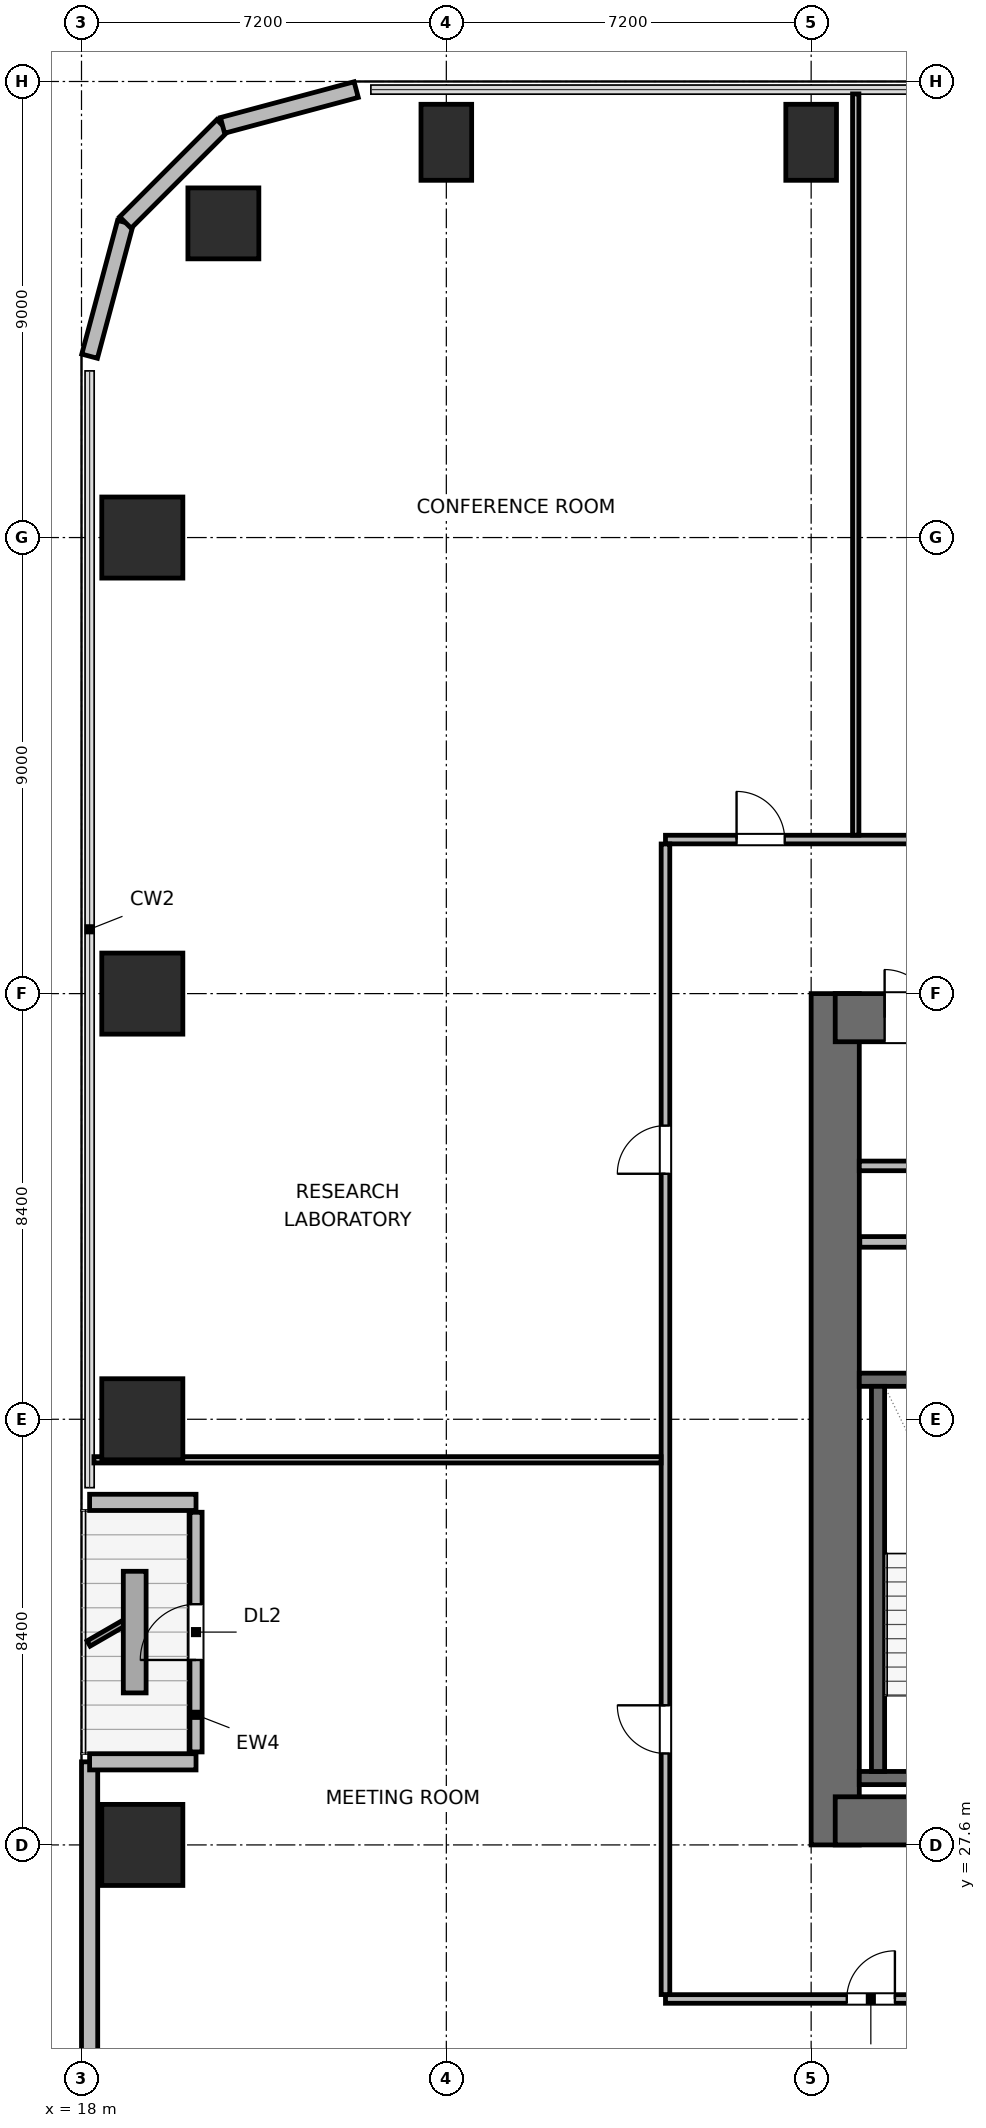
"""IFC4 building model, lengths in metres.
Left out: names, types, materials, properties, quantities, classifications, styles, units other than length and angle.
Written with IfcOpenShell. Run it as: python <this file> out.ifc"""

import sys

from ifc_helpers import new_model, si_unit, direction, frame, frame_2d, origin, origin_2d, place, context, subcontext, project, spatial, rectangle, circle, extrude, element, fill, save


model = new_model("IFC4")
c1 = context("Model", 3, precision=1e-05, world=origin(), true_north=direction((0.0, 1.0)))
c2 = subcontext(c1, "Body", "Model", "MODEL_VIEW")
j1 = project(units=[si_unit("LENGTHUNIT", "METRE"), si_unit("PLANEANGLEUNIT", "RADIAN")], contexts=[c1])
p1 = place(None, origin())
s1 = spatial("IfcSite", under=j1, at=p1, CompositionType="ELEMENT")
p2 = place(p1, origin())
s2 = spatial("IfcBuilding", under=s1, at=p2, CompositionType="ELEMENT")
p3 = place(p2, frame((0.0, 0.0, 76.8)))
s3 = spatial("IfcBuildingStorey", under=s2, at=p3, CompositionType="ELEMENT", Elevation=76.8)
p4 = place(p3, frame((32.875, 27.6, 0.0), z_axis=(0.0, 0.0, 1.0), x_axis=(0.0, 1.0, 0.0)))
e1 = element("IfcWall", 1, at=p4, inside=s3, PredefinedType="SHEAR", context=c2, shape_type="SweptSolid", body=[
    extrude(rectangle(XDim=16.8, YDim=0.95, at=frame_2d((8.4, 0.0))), origin(), (0.0, 0.0, 1.0), 3.9),
])
p5 = place(p3, frame((32.875, 28.075, 0.0), z_axis=(0.0, 0.0, 1.0), x_axis=(1.0, 0.0, 0.0)))
e2 = element("IfcWall", 2, at=p5, inside=s3, PredefinedType="SHEAR", context=c2, shape_type="SweptSolid", body=[
    extrude(rectangle(XDim=9.05, YDim=0.95, at=frame_2d((4.525, 0.0))), origin(), (0.0, 0.0, 1.0), 3.9),
])
p6 = place(p5, frame((4.975, 0.0, 0.0)))
e3 = element("IfcOpeningElement", 3, at=p6, cuts=e2, PredefinedType="OPENING", context=c2, shape_type="SweptSolid", body=[
    extrude(rectangle(XDim=1.05, YDim=2.04, at=frame_2d((0.525, 1.02))), frame((0.0, 0.485, 0.0), z_axis=(0.0, -1.0, 0.0), x_axis=(1.0, 0.0, 0.0)), (0.0, 0.0, 1.0), 0.97),
])
p7 = place(p3, frame((32.875, 43.925, 0.0), z_axis=(0.0, 0.0, 1.0), x_axis=(1.0, 0.0, 0.0)))
e4 = element("IfcWall", 4, at=p7, inside=s3, PredefinedType="SHEAR", context=c2, shape_type="SweptSolid", body=[
    extrude(rectangle(XDim=9.05, YDim=0.95, at=frame_2d((4.525, 0.0))), origin(), (0.0, 0.0, 1.0), 3.9),
])
p8 = place(p7, frame((0.975, 0.0, 0.0)))
e5 = element("IfcOpeningElement", 5, at=p8, cuts=e4, PredefinedType="OPENING", context=c2, shape_type="SweptSolid", body=[
    extrude(rectangle(XDim=0.95, YDim=2.04, at=frame_2d((0.475, 1.02))), frame((0.0, 0.485, 0.0), z_axis=(0.0, -1.0, 0.0), x_axis=(1.0, 0.0, 0.0)), (0.0, 0.0, 1.0), 0.97),
])
p9 = place(p7, frame((4.225, 0.0, 0.0)))
e6 = element("IfcOpeningElement", 6, at=p9, cuts=e4, PredefinedType="OPENING", context=c2, shape_type="SweptSolid", body=[
    extrude(rectangle(XDim=0.9, YDim=2.02, at=frame_2d((0.45, 1.01))), frame((0.0, 0.485, 0.0), z_axis=(0.0, -1.0, 0.0), x_axis=(1.0, 0.0, 0.0)), (0.0, 0.0, 1.0), 0.97),
])
p10 = place(p7, frame((7.125, 0.0, 0.0)))
e7 = element("IfcOpeningElement", 7, at=p10, cuts=e4, PredefinedType="OPENING", context=c2, shape_type="SweptSolid", body=[
    extrude(rectangle(XDim=0.9, YDim=2.02, at=frame_2d((0.45, 1.01))), frame((0.0, 0.485, 0.0), z_axis=(0.0, -1.0, 0.0), x_axis=(1.0, 0.0, 0.0)), (0.0, 0.0, 1.0), 0.97),
])
for number, where, z_axis, x_axis in (
    (8, (33.35, 28.92, 0.0), (0.0, 0.0, 1.0), (1.0, 0.0, 0.0)),
    (9, (33.35, 36.78, 0.0), (0.0, 0.0, 1.0), (1.0, 0.0, 0.0)),
):
    element("IfcWall", number, at=place(p3, frame(where, z_axis=z_axis, x_axis=x_axis)), inside=s3, PredefinedType="SHEAR", context=c2, shape_type="SweptSolid", body=[
        extrude(rectangle(XDim=3.76, YDim=0.26, at=frame_2d((1.88, 0.0))), origin(), (0.0, 0.0, 1.0), 3.9),
    ])
p11 = place(p3, frame((33.72, 29.05, 0.0), z_axis=(0.0, 0.0, 1.0), x_axis=(0.0, 1.0, 0.0)))
e10 = element("IfcWall", 10, at=p11, inside=s3, PredefinedType="SHEAR", context=c2, shape_type="SweptSolid", body=[
    extrude(rectangle(XDim=7.6, YDim=0.26, at=frame_2d((3.8, 0.0))), origin(), (0.0, 0.0, 1.0), 3.9),
])
p12 = place(p3, frame((20.8, 59.6, 0.0), z_axis=(0.0, 0.0, 1.0), x_axis=(1.0, 0.0, 0.0)))
e11 = element("IfcColumn", 11, at=p12, inside=s3, PredefinedType="COLUMN", context=c2, shape_type="SweptSolid", body=[
    extrude(circle(Radius=0.7, at=origin_2d()), origin(), (0.0, 0.0, 1.0), 3.9),
])
for number, where, z_axis, x_axis in (
    (12, (25.2, 61.2, 0.0), (0.0, 0.0, 1.0), (1.0, 0.0, 0.0)),
    (13, (32.4, 61.2, 0.0), (0.0, 0.0, 1.0), (1.0, 0.0, 0.0)),
):
    element("IfcColumn", number, at=place(p3, frame(where, z_axis=z_axis, x_axis=x_axis)), inside=s3, PredefinedType="COLUMN", context=c2, shape_type="SweptSolid", body=[
        extrude(rectangle(XDim=1.0, YDim=1.5, at=origin_2d()), origin(), (0.0, 0.0, 1.0), 3.9),
    ])
for number, where, z_axis, x_axis in (
    (14, (19.2, 27.6, 0.0), (0.0, 0.0, 1.0), (1.0, 0.0, 0.0)),
    (15, (19.2, 36.0, 0.0), (0.0, 0.0, 1.0), (1.0, 0.0, 0.0)),
    (16, (19.2, 44.4, 0.0), (0.0, 0.0, 1.0), (1.0, 0.0, 0.0)),
    (17, (19.2, 53.4, 0.0), (0.0, 0.0, 1.0), (1.0, 0.0, 0.0)),
):
    element("IfcColumn", number, at=place(p3, frame(where, z_axis=z_axis, x_axis=x_axis)), inside=s3, PredefinedType="COLUMN", context=c2, shape_type="SweptSolid", body=[
        extrude(rectangle(XDim=1.6, YDim=1.6, at=origin_2d()), origin(), (0.0, 0.0, 1.0), 3.9),
    ])
p13 = place(p3, frame((18.16, 15.021, 0.0), z_axis=(0.0, 0.0, 1.0), x_axis=(0.0, 1.0, 0.0)))
e18 = element("IfcWall", 18, at=p13, inside=s3, PredefinedType="SOLIDWALL", context=c2, shape_type="SweptSolid", body=[
    extrude(rectangle(XDim=14.219, YDim=0.32, at=frame_2d((7.109, 0.0))), origin(), (0.0, 0.0, 1.0), 3.6),
])
p14 = place(p3, frame((18.16, 29.24, 0.0), z_axis=(0.0, 0.0, 1.0), x_axis=(1.0, 0.0, 0.0)))
e19 = element("IfcWall", 19, at=p14, inside=s3, PredefinedType="SOLIDWALL", context=c2, shape_type="SweptSolid", body=[
    extrude(rectangle(XDim=2.1, YDim=0.32, at=frame_2d((1.05, 0.0))), origin(), (0.0, 0.0, 1.0), 2.185),
])
p15 = place(p3, frame((20.26, 29.435, 0.0), z_axis=(0.0, 0.0, 1.0), x_axis=(0.0, 1.0, 0.0)))
e20 = element("IfcWall", 20, at=p15, inside=s3, PredefinedType="SOLIDWALL", context=c2, shape_type="SweptSolid", body=[
    extrude(rectangle(XDim=4.73, YDim=0.24, at=frame_2d((2.365, 0.0))), origin(), (0.0, 0.0, 1.0), 3.122),
])
p16 = place(p15, frame((1.815, 0.0, 0.0)))
e21 = element("IfcOpeningElement", 21, at=p16, cuts=e20, PredefinedType="OPENING", context=c2, shape_type="SweptSolid", body=[
    extrude(rectangle(XDim=1.1, YDim=2.04, at=frame_2d((0.55, 1.02))), frame((0.0, 0.13, 0.0), z_axis=(0.0, -1.0, 0.0), x_axis=(1.0, 0.0, 0.0)), (0.0, 0.0, 1.0), 0.26),
])
p17 = place(p3, frame((20.26, 34.36, 0.0), z_axis=(0.0, 0.0, 1.0), x_axis=(-1.0, 0.0, 0.0)))
e22 = element("IfcWall", 22, at=p17, inside=s3, PredefinedType="SOLIDWALL", context=c2, shape_type="SweptSolid", body=[
    extrude(rectangle(XDim=2.1, YDim=0.32, at=frame_2d((1.05, 0.0))), origin(), (0.0, 0.0, 1.0), 2.185),
])
p18 = place(p3, frame((18.16, 56.979, 0.0), z_axis=(0.0, 0.0, 1.0), x_axis=(0.25869736047, 0.965958423373, 0.0)))
e23 = element("IfcWall", 23, at=p18, inside=s3, PredefinedType="SOLIDWALL", context=c2, shape_type="SweptSolid", body=[
    extrude(rectangle(XDim=2.731, YDim=0.32, at=frame_2d((1.366, 0.0))), origin(), (0.0, 0.0, 1.0), 3.6),
])
p19 = place(p3, frame((18.866, 59.617, 0.0), z_axis=(0.0, 0.0, 1.0), x_axis=(0.707106781187, 0.707106781187, 0.0)))
e24 = element("IfcWall", 24, at=p19, inside=s3, PredefinedType="SOLIDWALL", context=c2, shape_type="SweptSolid", body=[
    extrude(rectangle(XDim=2.71, YDim=0.32, at=frame_2d((1.355, 0.0))), origin(), (0.0, 0.0, 1.0), 3.6),
])
p20 = place(p3, frame((20.783, 61.533, 0.0), z_axis=(0.0, 0.0, 1.0), x_axis=(0.965964405026, 0.25867502435, 0.0)))
e25 = element("IfcWall", 25, at=p20, inside=s3, PredefinedType="SOLIDWALL", context=c2, shape_type="SweptSolid", body=[
    extrude(rectangle(XDim=2.731, YDim=0.32, at=frame_2d((1.366, 0.0))), origin(), (0.0, 0.0, 1.0), 3.6),
])
p21 = place(p3, frame((33.35, 41.0, 0.0), z_axis=(0.0, 0.0, 1.0), x_axis=(1.0, 0.0, 0.0)))
e26 = element("IfcWall", 26, at=p21, inside=s3, PredefinedType="PLUMBINGWALL", context=c2, shape_type="SweptSolid", body=[
    extrude(rectangle(XDim=8.1, YDim=0.19, at=frame_2d((4.05, 0.0))), origin(), (0.0, 0.0, 1.0), 3.6),
])
p22 = place(p3, frame((33.36, 39.5, 0.0), z_axis=(0.0, 0.0, 1.0), x_axis=(1.0, 0.0, 0.0)))
e27 = element("IfcWall", 27, at=p22, inside=s3, PredefinedType="PARTITIONING", context=c2, shape_type="SweptSolid", body=[
    extrude(rectangle(XDim=1.86, YDim=0.21, at=frame_2d((0.93, 0.0))), origin(), (0.0, 0.0, 1.0), 3.6),
])
p23 = place(p3, frame((29.525, 24.56, 0.0), z_axis=(0.0, 0.0, 1.0), x_axis=(1.0, 0.0, 0.0)))
e28 = element("IfcWall", 28, at=p23, inside=s3, PredefinedType="PARTITIONING", context=c2, shape_type="SweptSolid", body=[
    extrude(rectangle(XDim=36.95, YDim=0.17, at=frame_2d((18.475, 0.0))), origin(), (0.0, 0.0, 1.0), 3.6),
])
p24 = place(p23, frame((3.578, 0.0, 0.0)))
e29 = element("IfcOpeningElement", 29, at=p24, cuts=e28, PredefinedType="OPENING", context=c2, shape_type="SweptSolid", body=[
    extrude(rectangle(XDim=0.95, YDim=2.04, at=frame_2d((0.475, 1.02))), frame((0.0, 0.095, 0.0), z_axis=(0.0, -1.0, 0.0), x_axis=(1.0, 0.0, 0.0)), (0.0, 0.0, 1.0), 0.19),
])
p25 = place(p23, frame((10.615, 0.0, 0.0)))
e30 = element("IfcOpeningElement", 30, at=p25, cuts=e28, PredefinedType="OPENING", context=c2, shape_type="SweptSolid", body=[
    extrude(rectangle(XDim=0.95, YDim=2.04, at=frame_2d((0.475, 1.02))), frame((0.0, 0.095, 0.0), z_axis=(0.0, -1.0, 0.0), x_axis=(1.0, 0.0, 0.0)), (0.0, 0.0, 1.0), 0.19),
])
p26 = place(p23, frame((17.525, 0.0, 0.0)))
e31 = element("IfcOpeningElement", 31, at=p26, cuts=e28, PredefinedType="OPENING", context=c2, shape_type="SweptSolid", body=[
    extrude(rectangle(XDim=0.95, YDim=2.04, at=frame_2d((0.475, 1.02))), frame((0.0, 0.095, 0.0), z_axis=(0.0, -1.0, 0.0), x_axis=(1.0, 0.0, 0.0)), (0.0, 0.0, 1.0), 0.19),
])
p27 = place(p23, frame((24.905, 0.0, 0.0)))
e32 = element("IfcOpeningElement", 32, at=p27, cuts=e28, PredefinedType="OPENING", context=c2, shape_type="SweptSolid", body=[
    extrude(rectangle(XDim=0.95, YDim=2.04, at=frame_2d((0.475, 1.02))), frame((0.0, 0.095, 0.0), z_axis=(0.0, -1.0, 0.0), x_axis=(1.0, 0.0, 0.0)), (0.0, 0.0, 1.0), 0.19),
])
p28 = place(p23, frame((32.418, 0.0, 0.0)))
e33 = element("IfcOpeningElement", 33, at=p28, cuts=e28, PredefinedType="OPENING", context=c2, shape_type="SweptSolid", body=[
    extrude(rectangle(XDim=0.95, YDim=2.04, at=frame_2d((0.475, 1.02))), frame((0.0, 0.095, 0.0), z_axis=(0.0, -1.0, 0.0), x_axis=(1.0, 0.0, 0.0)), (0.0, 0.0, 1.0), 0.19),
])
p29 = place(p3, frame((29.525, 47.44, 0.0), z_axis=(0.0, 0.0, 1.0), x_axis=(1.0, 0.0, 0.0)))
e34 = element("IfcWall", 34, at=p29, inside=s3, PredefinedType="PARTITIONING", context=c2, shape_type="SweptSolid", body=[
    extrude(rectangle(XDim=36.95, YDim=0.17, at=frame_2d((18.475, 0.0))), origin(), (0.0, 0.0, 1.0), 3.6),
])
p30 = place(p29, frame((1.403, 0.0, 0.0)))
e35 = element("IfcOpeningElement", 35, at=p30, cuts=e34, PredefinedType="OPENING", context=c2, shape_type="SweptSolid", body=[
    extrude(rectangle(XDim=0.95, YDim=2.04, at=frame_2d((0.475, 1.02))), frame((0.0, 0.095, 0.0), z_axis=(0.0, -1.0, 0.0), x_axis=(1.0, 0.0, 0.0)), (0.0, 0.0, 1.0), 0.19),
])
p31 = place(p29, frame((14.64, 0.0, 0.0)))
e36 = element("IfcOpeningElement", 36, at=p31, cuts=e34, PredefinedType="OPENING", context=c2, shape_type="SweptSolid", body=[
    extrude(rectangle(XDim=0.95, YDim=2.04, at=frame_2d((0.475, 1.02))), frame((0.0, 0.095, 0.0), z_axis=(0.0, -1.0, 0.0), x_axis=(1.0, 0.0, 0.0)), (0.0, 0.0, 1.0), 0.19),
])
p32 = place(p29, frame((31.237, 0.0, 0.0)))
e37 = element("IfcOpeningElement", 37, at=p32, cuts=e34, PredefinedType="OPENING", context=c2, shape_type="SweptSolid", body=[
    extrude(rectangle(XDim=0.95, YDim=2.04, at=frame_2d((0.475, 1.02))), frame((0.0, 0.095, 0.0), z_axis=(0.0, -1.0, 0.0), x_axis=(1.0, 0.0, 0.0)), (0.0, 0.0, 1.0), 0.19),
])
p33 = place(p3, frame((29.525, 24.647, 0.0), z_axis=(0.0, 0.0, 1.0), x_axis=(0.0, 1.0, 0.0)))
e38 = element("IfcWall", 38, at=p33, inside=s3, PredefinedType="PARTITIONING", context=c2, shape_type="SweptSolid", body=[
    extrude(rectangle(XDim=22.706, YDim=0.17, at=frame_2d((11.353, 0.0))), origin(), (0.0, 0.0, 1.0), 3.6),
])
p34 = place(p33, frame((4.758, 0.0, 0.0)))
e39 = element("IfcOpeningElement", 39, at=p34, cuts=e38, PredefinedType="OPENING", context=c2, shape_type="SweptSolid", body=[
    extrude(rectangle(XDim=0.95, YDim=2.04, at=frame_2d((0.475, 1.02))), frame((0.0, 0.095, 0.0), z_axis=(0.0, -1.0, 0.0), x_axis=(1.0, 0.0, 0.0)), (0.0, 0.0, 1.0), 0.19),
])
p35 = place(p33, frame((16.198, 0.0, 0.0)))
e40 = element("IfcOpeningElement", 40, at=p35, cuts=e38, PredefinedType="OPENING", context=c2, shape_type="SweptSolid", body=[
    extrude(rectangle(XDim=0.95, YDim=2.04, at=frame_2d((0.475, 1.02))), frame((0.0, 0.095, 0.0), z_axis=(0.0, -1.0, 0.0), x_axis=(1.0, 0.0, 0.0)), (0.0, 0.0, 1.0), 0.19),
])
p36 = place(p3, frame((33.28, 47.527, 0.0), z_axis=(0.0, 0.0, 1.0), x_axis=(0.0, 1.0, 0.0)))
e41 = element("IfcWall", 41, at=p36, inside=s3, PredefinedType="PARTITIONING", context=c2, shape_type="SweptSolid", body=[
    extrude(rectangle(XDim=14.628, YDim=0.125, at=frame_2d((7.314, 0.0))), origin(), (0.0, 0.0, 1.0), 3.6),
])
p37 = place(p3, frame((18.245, 35.2, 0.0), z_axis=(0.0, 0.0, 1.0), x_axis=(1.0, 0.0, 0.0)))
e42 = element("IfcWall", 42, at=p37, inside=s3, PredefinedType="PARTITIONING", context=c2, shape_type="SweptSolid", body=[
    extrude(rectangle(XDim=11.193, YDim=0.125, at=frame_2d((5.596, 0.0))), origin(), (0.0, 0.0, 1.0), 3.6),
])
p38 = place(p16, origin())
e43 = element("IfcDoor", 43, at=p38, inside=s3, OperationType="SINGLE_SWING_LEFT", PredefinedType="DOOR", context=c2, shape_type="SweptSolid", body=[
    extrude(rectangle(XDim=1.1, YDim=2.04, at=frame_2d((0.55, 1.02))), frame((0.0, 0.025, 0.0), z_axis=(0.0, -1.0, 0.0), x_axis=(1.0, 0.0, 0.0)), (0.0, 0.0, 1.0), 0.05),
])
fill(e21, e43)
p39 = place(p8, origin())
e44 = element("IfcDoor", 44, at=p39, inside=s3, OperationType="SINGLE_SWING_LEFT", PredefinedType="DOOR", context=c2, shape_type="SweptSolid", body=[
    extrude(rectangle(XDim=0.95, YDim=2.04, at=frame_2d((0.475, 1.02))), frame((0.0, 0.025, 0.0), z_axis=(0.0, -1.0, 0.0), x_axis=(1.0, 0.0, 0.0)), (0.0, 0.0, 1.0), 0.05),
])
fill(e5, e44)
p40 = place(p24, origin())
e45 = element("IfcDoor", 45, at=p40, inside=s3, OperationType="SINGLE_SWING_RIGHT", PredefinedType="DOOR", context=c2, shape_type="SweptSolid", body=[
    extrude(rectangle(XDim=0.95, YDim=2.04, at=frame_2d((0.475, 1.02))), frame((0.0, 0.025, 0.0), z_axis=(0.0, -1.0, 0.0), x_axis=(1.0, 0.0, 0.0)), (0.0, 0.0, 1.0), 0.05),
])
fill(e29, e45)
p41 = place(p30, origin())
e46 = element("IfcDoor", 46, at=p41, inside=s3, OperationType="SINGLE_SWING_LEFT", PredefinedType="DOOR", context=c2, shape_type="SweptSolid", body=[
    extrude(rectangle(XDim=0.95, YDim=2.04, at=frame_2d((0.475, 1.02))), frame((0.0, 0.025, 0.0), z_axis=(0.0, -1.0, 0.0), x_axis=(1.0, 0.0, 0.0)), (0.0, 0.0, 1.0), 0.05),
])
fill(e35, e46)
p42 = place(p34, origin())
e47 = element("IfcDoor", 47, at=p42, inside=s3, OperationType="SINGLE_SWING_RIGHT", PredefinedType="DOOR", context=c2, shape_type="SweptSolid", body=[
    extrude(rectangle(XDim=0.95, YDim=2.04, at=frame_2d((0.475, 1.02))), frame((0.0, 0.025, 0.0), z_axis=(0.0, -1.0, 0.0), x_axis=(1.0, 0.0, 0.0)), (0.0, 0.0, 1.0), 0.05),
])
fill(e39, e47)
p43 = place(p35, origin())
e48 = element("IfcDoor", 48, at=p43, inside=s3, OperationType="SINGLE_SWING_LEFT", PredefinedType="DOOR", context=c2, shape_type="SweptSolid", body=[
    extrude(rectangle(XDim=0.95, YDim=2.04, at=frame_2d((0.475, 1.02))), frame((0.0, 0.025, 0.0), z_axis=(0.0, -1.0, 0.0), x_axis=(1.0, 0.0, 0.0)), (0.0, 0.0, 1.0), 0.05),
])
fill(e40, e48)
save(model, sys.argv[1])
